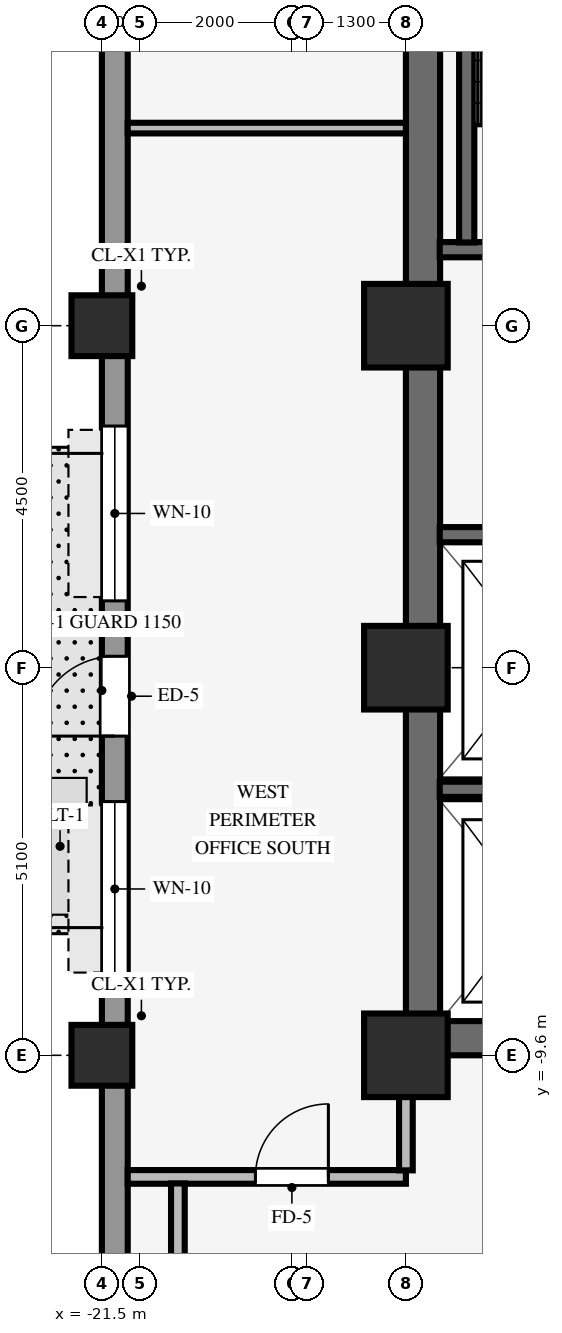
"""IFC4 building model, lengths in metres.
Left out: names, types, materials, properties, quantities, classifications, styles, units other than length and angle.
Written with IfcOpenShell. Run it as: python <this file> out.ifc"""

import sys

from ifc_helpers import new_model, si_unit, direction, frame, frame_2d, origin, origin_2d, place, context, subcontext, project, spatial, rectangle, hollow_rectangle, extrude, source, transform, mapped, element, fill, save


model = new_model("IFC4")
c1 = context("Model", 3, precision=1e-05, world=origin(), true_north=direction((0.0, 1.0)))
c2 = subcontext(c1, "Body", "Model", "MODEL_VIEW")
j1 = project(units=[si_unit("LENGTHUNIT", "METRE"), si_unit("PLANEANGLEUNIT", "RADIAN")], contexts=[c1])
p1 = place(None, origin())
s1 = spatial("IfcSite", under=j1, at=p1, CompositionType="ELEMENT")
p2 = place(p1, origin())
s2 = spatial("IfcBuilding", under=s1, at=p2, CompositionType="ELEMENT")
p3 = place(p2, frame((0.0, 0.0, 60.45)))
s3 = spatial("IfcBuildingStorey", under=s2, at=p3, CompositionType="ELEMENT", Elevation=60.45)
p4 = place(p3, frame((-17.5, -9.375, 0.0), z_axis=(0.0, 0.0, 1.0), x_axis=(1.0, 0.0, 0.0)))
e1 = element("IfcWall", 1, at=p4, inside=s3, PredefinedType="SHEAR", context=c2, shape_type="SweptSolid", body=[
    extrude(rectangle(XDim=8.5, YDim=0.45, at=frame_2d((4.25, 0.0))), origin(), (0.0, 0.0, 1.0), 3.37),
])
p5 = place(p3, frame((-17.275, -9.155, 0.0), z_axis=(0.0, 0.0, 1.0), x_axis=(0.0, 1.0, 0.0)))
e2 = element("IfcWall", 2, at=p5, inside=s3, PredefinedType="SHEAR", context=c2, shape_type="SweptSolid", body=[
    extrude(rectangle(XDim=18.31, YDim=0.45, at=frame_2d((9.155, 0.0))), origin(), (0.0, 0.0, 1.0), 3.37),
])
for number, where, z_axis, x_axis in (
    (3, (-17.5, -9.6, 0.0), (0.0, 0.0, 1.0), (1.0, 0.0, 0.0)),
    (4, (-17.5, -4.5, 0.0), (0.0, 0.0, 1.0), (1.0, 0.0, 0.0)),
    (5, (-17.5, 0.0, 0.0), (0.0, 0.0, 1.0), (1.0, 0.0, 0.0)),
):
    element("IfcColumn", number, at=place(p3, frame(where, z_axis=z_axis, x_axis=x_axis)), inside=s3, PredefinedType="COLUMN", context=c2, shape_type="SweptSolid", body=[
        extrude(rectangle(XDim=1.1, YDim=1.1, at=origin_2d()), origin(), (0.0, 0.0, 1.0), 3.37),
    ])
for number, where, z_axis, x_axis in (
    (6, (-21.5, -9.6, 0.0), (0.0, 0.0, 1.0), (1.0, 0.0, 0.0)),
    (7, (-21.5, 0.0, 0.0), (0.0, 0.0, 1.0), (1.0, 0.0, 0.0)),
):
    element("IfcColumn", number, at=place(p3, frame(where, z_axis=z_axis, x_axis=x_axis)), inside=s3, PredefinedType="COLUMN", context=c2, shape_type="SweptSolid", body=[
        extrude(hollow_rectangle(XDim=0.8, YDim=0.8, WallThickness=0.055, InnerFilletRadius=0.055, OuterFilletRadius=0.11, at=origin_2d()), origin(), (0.0, 0.0, 1.0), 3.37),
    ])
p6 = place(p3, frame((-21.33, -20.764, 0.0), z_axis=(0.0, 0.0, 1.0), x_axis=(0.0, 1.0, 0.0)))
e8 = element("IfcWall", 8, at=p6, inside=s3, PredefinedType="STANDARD", context=c2, shape_type="SweptSolid", body=[
    extrude(rectangle(XDim=41.528, YDim=0.34, at=frame_2d((20.764, 0.0))), origin(), (0.0, 0.0, 1.0), 2.705),
])
p7 = place(p6, frame((15.364, 0.0, 0.0)))
e9 = element("IfcOpeningElement", 9, at=p7, cuts=e8, PredefinedType="OPENING", context=c2, shape_type="SweptSolid", body=[
    extrude(rectangle(XDim=1.05, YDim=2.1, at=frame_2d((0.525, 1.05))), frame((0.0, 0.18, 0.0), z_axis=(0.0, -1.0, 0.0), x_axis=(1.0, 0.0, 0.0)), (0.0, 0.0, 1.0), 0.36),
])
p8 = place(p6, frame((12.202, 0.0, 0.8)))
e10 = element("IfcOpeningElement", 10, at=p8, cuts=e8, PredefinedType="OPENING", context=c2, shape_type="SweptSolid", body=[
    extrude(rectangle(XDim=2.3, YDim=1.62, at=frame_2d((1.15, 0.81))), frame((0.0, 0.18, 0.0), z_axis=(0.0, -1.0, 0.0), x_axis=(1.0, 0.0, 0.0)), (0.0, 0.0, 1.0), 0.36),
])
p9 = place(p6, frame((17.144, 0.0, 0.8)))
e11 = element("IfcOpeningElement", 11, at=p9, cuts=e8, PredefinedType="OPENING", context=c2, shape_type="SweptSolid", body=[
    extrude(rectangle(XDim=2.3, YDim=1.62, at=frame_2d((1.15, 0.81))), frame((0.0, 0.18, 0.0), z_axis=(0.0, -1.0, 0.0), x_axis=(1.0, 0.0, 0.0)), (0.0, 0.0, 1.0), 0.36),
])
p10 = place(p6, frame((27.025, 0.0, 0.8)))
e12 = element("IfcOpeningElement", 12, at=p10, cuts=e8, PredefinedType="OPENING", context=c2, shape_type="SweptSolid", body=[
    extrude(rectangle(XDim=2.3, YDim=1.62, at=frame_2d((1.15, 0.81))), frame((0.0, 0.18, 0.0), z_axis=(0.0, -1.0, 0.0), x_axis=(1.0, 0.0, 0.0)), (0.0, 0.0, 1.0), 0.36),
])
p11 = place(p3, frame((-17.055, 1.0, 0.0), z_axis=(0.0, 0.0, 1.0), x_axis=(1.0, 0.0, 0.0)))
e13 = element("IfcWall", 13, at=p11, inside=s3, PredefinedType="SHEAR", context=c2, shape_type="SweptSolid", body=[
    extrude(rectangle(XDim=3.52, YDim=0.2, at=frame_2d((1.76, 0.0))), origin(), (0.0, 0.0, 1.0), 3.37),
])
p12 = place(p3, frame((-16.7, 1.095, 0.0), z_axis=(0.0, 0.0, 1.0), x_axis=(0.0, 1.0, 0.0)))
e14 = element("IfcWall", 14, at=p12, inside=s3, PredefinedType="SHEAR", context=c2, shape_type="SweptSolid", body=[
    extrude(rectangle(XDim=8.06, YDim=0.2, at=frame_2d((4.03, 0.0))), origin(), (0.0, 0.0, 1.0), 3.37),
])
p13 = place(p3, frame((-17.055, -6.1, 0.0), z_axis=(0.0, 0.0, 1.0), x_axis=(1.0, 0.0, 0.0)))
e15 = element("IfcWall", 15, at=p13, inside=s3, PredefinedType="SHEAR", context=c2, shape_type="SweptSolid", body=[
    extrude(rectangle(XDim=2.805, YDim=0.2, at=frame_2d((1.402, 0.0))), origin(), (0.0, 0.0, 1.0), 3.37),
])
p14 = place(p3, frame((-17.055, -2.75, 0.0), z_axis=(0.0, 0.0, 1.0), x_axis=(1.0, 0.0, 0.0)))
e16 = element("IfcWall", 16, at=p14, inside=s3, PredefinedType="SHEAR", context=c2, shape_type="SweptSolid", body=[
    extrude(rectangle(XDim=2.61, YDim=0.2, at=frame_2d((1.305, 0.0))), origin(), (0.0, 0.0, 1.0), 3.37),
])
p15 = place(p3, frame((-21.16, -11.2, 0.0), z_axis=(0.0, 0.0, 1.0), x_axis=(1.0, 0.0, 0.0)))
e17 = element("IfcWall", 17, at=p15, inside=s3, PredefinedType="PARTITIONING", context=c2, shape_type="SweptSolid", body=[
    extrude(rectangle(XDim=3.66, YDim=0.18, at=frame_2d((1.83, 0.0))), origin(), (0.0, 0.0, 1.0), 3.36),
])
p16 = place(p15, frame((1.68, 0.0, 0.0)))
e18 = element("IfcOpeningElement", 18, at=p16, cuts=e17, PredefinedType="OPENING", context=c2, shape_type="SweptSolid", body=[
    extrude(rectangle(XDim=0.96, YDim=2.1, at=frame_2d((0.48, 1.05))), frame((0.0, 0.1, 0.0), z_axis=(0.0, -1.0, 0.0), x_axis=(1.0, 0.0, 0.0)), (0.0, 0.0, 1.0), 0.2),
])
p17 = place(p3, frame((-21.16, 2.6, 0.0), z_axis=(0.0, 0.0, 1.0), x_axis=(1.0, 0.0, 0.0)))
e19 = element("IfcWall", 19, at=p17, inside=s3, PredefinedType="PARTITIONING", context=c2, shape_type="SweptSolid", body=[
    extrude(rectangle(XDim=3.66, YDim=0.14, at=frame_2d((1.83, 0.0))), origin(), (0.0, 0.0, 1.0), 3.36),
])
p18 = place(p3, frame((-20.5, -13.514, 0.0), z_axis=(0.0, 0.0, 1.0), x_axis=(0.0, 1.0, 0.0)))
e20 = element("IfcWall", 20, at=p18, inside=s3, PredefinedType="PARTITIONING", context=c2, shape_type="SweptSolid", body=[
    extrude(rectangle(XDim=2.228, YDim=0.18, at=frame_2d((1.114, 0.0))), origin(), (0.0, 0.0, 1.0), 3.36),
])
p19 = place(p3, frame((-17.5, -11.114, 0.0), z_axis=(0.0, 0.0, 1.0), x_axis=(0.0, 1.0, 0.0)))
e21 = element("IfcWall", 21, at=p19, inside=s3, PredefinedType="PARTITIONING", context=c2, shape_type="SweptSolid", body=[
    extrude(rectangle(XDim=0.968, YDim=0.18, at=frame_2d((0.484, 0.0))), origin(), (0.0, 0.0, 1.0), 2.738),
])
m1 = source(origin(), c2, "Body", "SweptSolid", [
    extrude(rectangle(XDim=1.05, YDim=2.1, at=frame_2d((0.525, 1.05))), frame((0.0, 0.025, 0.0), z_axis=(0.0, -1.0, 0.0), x_axis=(1.0, 0.0, 0.0)), (0.0, 0.0, 1.0), 0.05),
])
p20 = place(p7, origin())
e22 = element("IfcDoor", 22, at=p20, inside=s3, OperationType="SINGLE_SWING_LEFT", PredefinedType="DOOR", context=c2, shape_type="MappedRepresentation", body=[
    mapped(m1, transform((0.0, 0.0, 0.0), scale=1.0)),
])
fill(e9, e22)
m2 = source(origin(), c2, "Body", "SweptSolid", [
    extrude(rectangle(XDim=2.3, YDim=1.62, at=frame_2d((1.15, 0.81))), frame((0.0, 0.03, 0.0), z_axis=(0.0, -1.0, 0.0), x_axis=(1.0, 0.0, 0.0)), (0.0, 0.0, 1.0), 0.06),
])
p21 = place(p8, origin())
e23 = element("IfcWindow", 23, at=p21, inside=s3, PartitioningType="SINGLE_PANEL", PredefinedType="WINDOW", context=c2, shape_type="MappedRepresentation", body=[
    mapped(m2, transform((0.0, 0.0, 0.0), scale=1.0)),
])
fill(e10, e23)
p22 = place(p9, origin())
e24 = element("IfcWindow", 24, at=p22, inside=s3, PartitioningType="SINGLE_PANEL", PredefinedType="WINDOW", context=c2, shape_type="MappedRepresentation", body=[
    mapped(m2, transform((0.0, 0.0, 0.0), scale=1.0)),
])
fill(e11, e24)
m3 = source(origin(), c2, "Body", "SweptSolid", [
    extrude(rectangle(XDim=0.96, YDim=2.1, at=frame_2d((0.48, 1.05))), frame((0.0, 0.025, 0.0), z_axis=(0.0, -1.0, 0.0), x_axis=(1.0, 0.0, 0.0)), (0.0, 0.0, 1.0), 0.05),
])
p23 = place(p16, origin())
e25 = element("IfcDoor", 25, at=p23, inside=s3, OperationType="SINGLE_SWING_RIGHT", PredefinedType="DOOR", context=c2, shape_type="MappedRepresentation", body=[
    mapped(m3, transform((0.0, 0.0, 0.0), scale=1.0)),
])
fill(e18, e25)
save(model, sys.argv[1])
